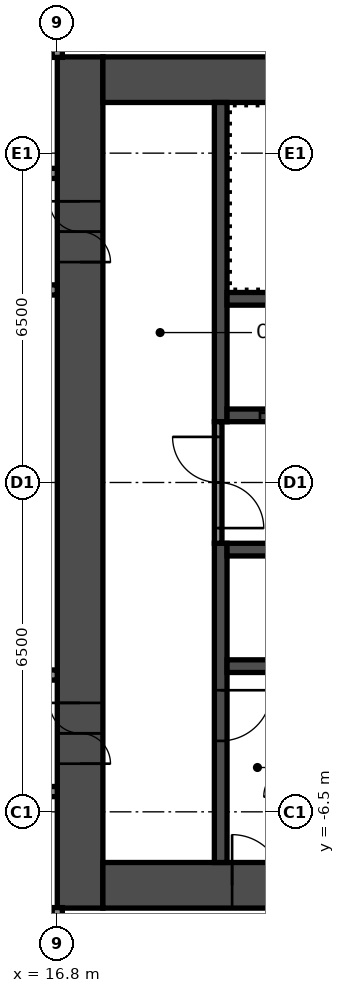
"""IFC4 building model, lengths in metres.
Left out: names, types, materials, properties, quantities, classifications, styles, units other than length and angle.
Written with IfcOpenShell. Run it as: python <this file> out.ifc"""

import sys

from ifc_helpers import new_model, si_unit, direction, frame, frame_2d, origin, place, context, subcontext, project, spatial, rectangle, extrude, element, fill, save


model = new_model("IFC4")
c1 = context("Model", 3, precision=1e-05, world=origin(), true_north=direction((0.0, 1.0)))
c2 = subcontext(c1, "Body", "Model", "MODEL_VIEW")
j1 = project(units=[si_unit("LENGTHUNIT", "METRE"), si_unit("PLANEANGLEUNIT", "RADIAN")], contexts=[c1])
p1 = place(None, origin())
s1 = spatial("IfcSite", under=j1, at=p1, CompositionType="ELEMENT")
p2 = place(p1, origin())
s2 = spatial("IfcBuilding", under=s1, at=p2, CompositionType="ELEMENT")
p3 = place(p2, frame((0.0, 0.0, 55.0)))
s3 = spatial("IfcBuildingStorey", under=s2, at=p3, CompositionType="ELEMENT", Elevation=55.0)
p4 = place(p3, frame((17.25, -8.4, 0.0), z_axis=(0.0, 0.0, 1.0), x_axis=(0.0, 1.0, 0.0)))
e1 = element("IfcWall", 1, at=p4, inside=s3, PredefinedType="SHEAR", context=c2, shape_type="SweptSolid", body=[
    extrude(rectangle(XDim=16.8, YDim=0.9, at=frame_2d((8.4, 0.0))), origin(), (0.0, 0.0, 1.0), 2.8),
])
p5 = place(p4, frame((12.75, 0.0, 0.0)))
e2 = element("IfcOpeningElement", 2, at=p5, cuts=e1, PredefinedType="OPENING", context=c2, shape_type="SweptSolid", body=[
    extrude(rectangle(XDim=1.2, YDim=2.1, at=frame_2d((0.6, 1.05))), frame((0.0, 0.46, 0.0), z_axis=(0.0, -1.0, 0.0), x_axis=(1.0, 0.0, 0.0)), (0.0, 0.0, 1.0), 0.92),
])
p6 = place(p4, frame((2.85, 0.0, 0.0)))
e3 = element("IfcOpeningElement", 3, at=p6, cuts=e1, PredefinedType="OPENING", context=c2, shape_type="SweptSolid", body=[
    extrude(rectangle(XDim=1.2, YDim=2.1, at=frame_2d((0.6, 1.05))), frame((0.0, 0.46, 0.0), z_axis=(0.0, -1.0, 0.0), x_axis=(1.0, 0.0, 0.0)), (0.0, 0.0, 1.0), 0.92),
])
p7 = place(p3, frame((17.7, 7.95, 0.0), z_axis=(0.0, 0.0, 1.0), x_axis=(1.0, 0.0, 0.0)))
e4 = element("IfcWall", 4, at=p7, inside=s3, PredefinedType="SHEAR", context=c2, shape_type="SweptSolid", body=[
    extrude(rectangle(XDim=15.0, YDim=0.9, at=frame_2d((7.5, 0.0))), origin(), (0.0, 0.0, 1.0), 2.8),
])
p8 = place(p7, frame((10.4, 0.0, 0.0)))
e5 = element("IfcOpeningElement", 5, at=p8, cuts=e4, PredefinedType="OPENING", context=c2, shape_type="SweptSolid", body=[
    extrude(rectangle(XDim=1.2, YDim=2.1, at=frame_2d((0.6, 1.05))), frame((0.0, 0.46, 0.0), z_axis=(0.0, -1.0, 0.0), x_axis=(1.0, 0.0, 0.0)), (0.0, 0.0, 1.0), 0.92),
])
p9 = place(p7, frame((13.35, 0.0, 0.0)))
e6 = element("IfcOpeningElement", 6, at=p9, cuts=e4, PredefinedType="OPENING", context=c2, shape_type="SweptSolid", body=[
    extrude(rectangle(XDim=0.9, YDim=2.1, at=frame_2d((0.45, 1.05))), frame((0.0, 0.46, 0.0), z_axis=(0.0, -1.0, 0.0), x_axis=(1.0, 0.0, 0.0)), (0.0, 0.0, 1.0), 0.92),
])
p10 = place(p3, frame((17.7, -7.95, 0.0), z_axis=(0.0, 0.0, 1.0), x_axis=(1.0, 0.0, 0.0)))
e7 = element("IfcWall", 7, at=p10, inside=s3, PredefinedType="SHEAR", context=c2, shape_type="SweptSolid", body=[
    extrude(rectangle(XDim=15.0, YDim=0.9, at=frame_2d((7.5, 0.0))), origin(), (0.0, 0.0, 1.0), 2.8),
])
p11 = place(p10, frame((2.55, 0.0, 0.0)))
e8 = element("IfcOpeningElement", 8, at=p11, cuts=e7, PredefinedType="OPENING", context=c2, shape_type="SweptSolid", body=[
    extrude(rectangle(XDim=1.0, YDim=2.1, at=frame_2d((0.5, 1.05))), frame((0.0, 0.46, 0.0), z_axis=(0.0, -1.0, 0.0), x_axis=(1.0, 0.0, 0.0)), (0.0, 0.0, 1.0), 0.92),
])
p12 = place(p3, frame((20.025, 1.2, 0.0), z_axis=(0.0, 0.0, 1.0), x_axis=(0.0, 1.0, 0.0)))
e9 = element("IfcWall", 9, at=p12, inside=s3, PredefinedType="SHEAR", context=c2, shape_type="SweptSolid", body=[
    extrude(rectangle(XDim=6.3, YDim=0.25, at=frame_2d((3.15, 0.0))), origin(), (0.0, 0.0, 1.0), 2.8),
])
p13 = place(p3, frame((20.025, -7.5, 0.0), z_axis=(0.0, 0.0, 1.0), x_axis=(0.0, 1.0, 0.0)))
e10 = element("IfcWall", 10, at=p13, inside=s3, PredefinedType="SHEAR", context=c2, shape_type="SweptSolid", body=[
    extrude(rectangle(XDim=6.3, YDim=0.25, at=frame_2d((3.15, 0.0))), origin(), (0.0, 0.0, 1.0), 2.8),
])
p14 = place(p13, frame((2.4, 0.0, 0.0)))
e11 = element("IfcOpeningElement", 11, at=p14, cuts=e10, PredefinedType="OPENING", context=c2, shape_type="SweptSolid", body=[
    extrude(rectangle(XDim=1.0, YDim=2.1, at=frame_2d((0.5, 1.05))), frame((0.0, 0.135, 0.0), z_axis=(0.0, -1.0, 0.0), x_axis=(1.0, 0.0, 0.0)), (0.0, 0.0, 1.0), 0.27),
])
p15 = place(p3, frame((20.15, 1.325, 0.0), z_axis=(0.0, 0.0, 1.0), x_axis=(1.0, 0.0, 0.0)))
e12 = element("IfcWall", 12, at=p15, inside=s3, PredefinedType="SHEAR", context=c2, shape_type="SweptSolid", body=[
    extrude(rectangle(XDim=7.5, YDim=0.25, at=frame_2d((3.75, 0.0))), origin(), (0.0, 0.0, 1.0), 2.8),
])
p16 = place(p15, frame((0.65, 0.0, 0.0)))
e13 = element("IfcOpeningElement", 13, at=p16, cuts=e12, PredefinedType="OPENING", context=c2, shape_type="SweptSolid", body=[
    extrude(rectangle(XDim=1.1, YDim=2.1, at=frame_2d((0.55, 1.05))), frame((0.0, 0.135, 0.0), z_axis=(0.0, -1.0, 0.0), x_axis=(1.0, 0.0, 0.0)), (0.0, 0.0, 1.0), 0.27),
])
p17 = place(p15, frame((3.05, 0.0, 0.0)))
e14 = element("IfcOpeningElement", 14, at=p17, cuts=e12, PredefinedType="OPENING", context=c2, shape_type="SweptSolid", body=[
    extrude(rectangle(XDim=1.1, YDim=2.1, at=frame_2d((0.55, 1.05))), frame((0.0, 0.135, 0.0), z_axis=(0.0, -1.0, 0.0), x_axis=(1.0, 0.0, 0.0)), (0.0, 0.0, 1.0), 0.27),
])
p18 = place(p15, frame((5.45, 0.0, 0.0)))
e15 = element("IfcOpeningElement", 15, at=p18, cuts=e12, PredefinedType="OPENING", context=c2, shape_type="SweptSolid", body=[
    extrude(rectangle(XDim=1.1, YDim=2.1, at=frame_2d((0.55, 1.05))), frame((0.0, 0.135, 0.0), z_axis=(0.0, -1.0, 0.0), x_axis=(1.0, 0.0, 0.0)), (0.0, 0.0, 1.0), 0.27),
])
for number, where, z_axis, x_axis in (
    (16, (20.15, 3.625, 0.0), (0.0, 0.0, 1.0), (1.0, 0.0, 0.0)),
    (17, (20.15, -1.325, 0.0), (0.0, 0.0, 1.0), (1.0, 0.0, 0.0)),
    (18, (20.15, -3.625, 0.0), (0.0, 0.0, 1.0), (1.0, 0.0, 0.0)),
):
    element("IfcWall", number, at=place(p3, frame(where, z_axis=z_axis, x_axis=x_axis)), inside=s3, PredefinedType="SHEAR", context=c2, shape_type="SweptSolid", body=[
        extrude(rectangle(XDim=7.5, YDim=0.25, at=frame_2d((3.75, 0.0))), origin(), (0.0, 0.0, 1.0), 2.8),
    ])
p19 = place(p3, frame((19.975, -1.2, 0.0), z_axis=(0.0, 0.0, 1.0), x_axis=(0.0, 1.0, 0.0)))
e19 = element("IfcWall", 19, at=p19, inside=s3, PredefinedType="PARTITIONING", context=c2, shape_type="SweptSolid", body=[
    extrude(rectangle(XDim=2.4, YDim=0.15, at=frame_2d((1.2, 0.0))), origin(), (0.0, 0.0, 1.0), 2.8),
])
p20 = place(p19, frame((0.3, 0.0, 0.0)))
e20 = element("IfcOpeningElement", 20, at=p20, cuts=e19, PredefinedType="OPENING", context=c2, shape_type="SweptSolid", body=[
    extrude(rectangle(XDim=1.8, YDim=2.1, at=frame_2d((0.9, 1.05))), frame((0.0, 0.085, 0.0), z_axis=(0.0, -1.0, 0.0), x_axis=(1.0, 0.0, 0.0)), (0.0, 0.0, 1.0), 0.17),
])
p21 = place(p3, frame((-16.8, -6.1, 0.0), z_axis=(0.0, 0.0, 1.0), x_axis=(1.0, 0.0, 0.0)))
e21 = element("IfcWall", 21, at=p21, inside=s3, PredefinedType="PARTITIONING", context=c2, shape_type="SweptSolid", body=[
    extrude(rectangle(XDim=33.6, YDim=0.2, at=frame_2d((16.8, 0.0))), origin(), (0.0, 0.0, 1.0), 2.8),
])
p22 = place(p21, frame((2.85, 0.0, 0.0)))
e22 = element("IfcOpeningElement", 22, at=p22, cuts=e21, PredefinedType="OPENING", context=c2, shape_type="SweptSolid", body=[
    extrude(rectangle(XDim=1.0, YDim=2.1, at=frame_2d((0.5, 1.05))), frame((0.0, 0.11, 0.0), z_axis=(0.0, -1.0, 0.0), x_axis=(1.0, 0.0, 0.0)), (0.0, 0.0, 1.0), 0.22),
])
p23 = place(p21, frame((4.55, 0.0, 0.0)))
e23 = element("IfcOpeningElement", 23, at=p23, cuts=e21, PredefinedType="OPENING", context=c2, shape_type="SweptSolid", body=[
    extrude(rectangle(XDim=1.0, YDim=2.1, at=frame_2d((0.5, 1.05))), frame((0.0, 0.11, 0.0), z_axis=(0.0, -1.0, 0.0), x_axis=(1.0, 0.0, 0.0)), (0.0, 0.0, 1.0), 0.22),
])
p24 = place(p21, frame((11.25, 0.0, 0.0)))
e24 = element("IfcOpeningElement", 24, at=p24, cuts=e21, PredefinedType="OPENING", context=c2, shape_type="SweptSolid", body=[
    extrude(rectangle(XDim=1.0, YDim=2.1, at=frame_2d((0.5, 1.05))), frame((0.0, 0.11, 0.0), z_axis=(0.0, -1.0, 0.0), x_axis=(1.0, 0.0, 0.0)), (0.0, 0.0, 1.0), 0.22),
])
p25 = place(p21, frame((12.95, 0.0, 0.0)))
e25 = element("IfcOpeningElement", 25, at=p25, cuts=e21, PredefinedType="OPENING", context=c2, shape_type="SweptSolid", body=[
    extrude(rectangle(XDim=1.0, YDim=2.1, at=frame_2d((0.5, 1.05))), frame((0.0, 0.11, 0.0), z_axis=(0.0, -1.0, 0.0), x_axis=(1.0, 0.0, 0.0)), (0.0, 0.0, 1.0), 0.22),
])
p26 = place(p21, frame((18.7, 0.0, 0.0)))
e26 = element("IfcOpeningElement", 26, at=p26, cuts=e21, PredefinedType="OPENING", context=c2, shape_type="SweptSolid", body=[
    extrude(rectangle(XDim=0.9, YDim=2.1, at=frame_2d((0.45, 1.05))), frame((0.0, 0.11, 0.0), z_axis=(0.0, -1.0, 0.0), x_axis=(1.0, 0.0, 0.0)), (0.0, 0.0, 1.0), 0.22),
])
p27 = place(p21, frame((22.9, 0.0, 0.0)))
e27 = element("IfcOpeningElement", 27, at=p27, cuts=e21, PredefinedType="OPENING", context=c2, shape_type="SweptSolid", body=[
    extrude(rectangle(XDim=0.9, YDim=2.1, at=frame_2d((0.45, 1.05))), frame((0.0, 0.11, 0.0), z_axis=(0.0, -1.0, 0.0), x_axis=(1.0, 0.0, 0.0)), (0.0, 0.0, 1.0), 0.22),
])
p28 = place(p21, frame((28.05, 0.0, 0.0)))
e28 = element("IfcOpeningElement", 28, at=p28, cuts=e21, PredefinedType="OPENING", context=c2, shape_type="SweptSolid", body=[
    extrude(rectangle(XDim=1.0, YDim=2.1, at=frame_2d((0.5, 1.05))), frame((0.0, 0.11, 0.0), z_axis=(0.0, -1.0, 0.0), x_axis=(1.0, 0.0, 0.0)), (0.0, 0.0, 1.0), 0.22),
])
p29 = place(p21, frame((29.75, 0.0, 0.0)))
e29 = element("IfcOpeningElement", 29, at=p29, cuts=e21, PredefinedType="OPENING", context=c2, shape_type="SweptSolid", body=[
    extrude(rectangle(XDim=1.0, YDim=2.1, at=frame_2d((0.5, 1.05))), frame((0.0, 0.11, 0.0), z_axis=(0.0, -1.0, 0.0), x_axis=(1.0, 0.0, 0.0)), (0.0, 0.0, 1.0), 0.22),
])
p30 = place(p3, frame((-16.8, -3.8, 0.0), z_axis=(0.0, 0.0, 1.0), x_axis=(1.0, 0.0, 0.0)))
e30 = element("IfcWall", 30, at=p30, inside=s3, PredefinedType="PARTITIONING", context=c2, shape_type="SweptSolid", body=[
    extrude(rectangle(XDim=33.6, YDim=0.2, at=frame_2d((16.8, 0.0))), origin(), (0.0, 0.0, 1.0), 2.8),
])
p31 = place(p30, frame((9.8, 0.0, 0.0)))
e31 = element("IfcOpeningElement", 31, at=p31, cuts=e30, PredefinedType="OPENING", context=c2, shape_type="SweptSolid", body=[
    extrude(rectangle(XDim=0.9, YDim=2.1, at=frame_2d((0.45, 1.05))), frame((0.0, 0.11, 0.0), z_axis=(0.0, -1.0, 0.0), x_axis=(1.0, 0.0, 0.0)), (0.0, 0.0, 1.0), 0.22),
])
p32 = place(p30, frame((14.0, 0.0, 0.0)))
e32 = element("IfcOpeningElement", 32, at=p32, cuts=e30, PredefinedType="OPENING", context=c2, shape_type="SweptSolid", body=[
    extrude(rectangle(XDim=0.9, YDim=2.1, at=frame_2d((0.45, 1.05))), frame((0.0, 0.11, 0.0), z_axis=(0.0, -1.0, 0.0), x_axis=(1.0, 0.0, 0.0)), (0.0, 0.0, 1.0), 0.22),
])
p33 = place(p30, frame((26.43, 0.0, 0.0)))
e33 = element("IfcOpeningElement", 33, at=p33, cuts=e30, PredefinedType="OPENING", context=c2, shape_type="SweptSolid", body=[
    extrude(rectangle(XDim=0.9, YDim=2.1, at=frame_2d((0.45, 1.05))), frame((0.0, 0.11, 0.0), z_axis=(0.0, -1.0, 0.0), x_axis=(1.0, 0.0, 0.0)), (0.0, 0.0, 1.0), 0.22),
])
p34 = place(p30, frame((30.63, 0.0, 0.0)))
e34 = element("IfcOpeningElement", 34, at=p34, cuts=e30, PredefinedType="OPENING", context=c2, shape_type="SweptSolid", body=[
    extrude(rectangle(XDim=0.9, YDim=2.1, at=frame_2d((0.45, 1.05))), frame((0.0, 0.11, 0.0), z_axis=(0.0, -1.0, 0.0), x_axis=(1.0, 0.0, 0.0)), (0.0, 0.0, 1.0), 0.22),
])
p35 = place(p3, frame((-16.8, 3.8, 0.0), z_axis=(0.0, 0.0, 1.0), x_axis=(1.0, 0.0, 0.0)))
e35 = element("IfcWall", 35, at=p35, inside=s3, PredefinedType="PARTITIONING", context=c2, shape_type="SweptSolid", body=[
    extrude(rectangle(XDim=33.6, YDim=0.2, at=frame_2d((16.8, 0.0))), origin(), (0.0, 0.0, 1.0), 2.8),
])
p36 = place(p35, frame((1.48, 0.0, 0.0)))
e36 = element("IfcOpeningElement", 36, at=p36, cuts=e35, PredefinedType="OPENING", context=c2, shape_type="SweptSolid", body=[
    extrude(rectangle(XDim=0.9, YDim=2.1, at=frame_2d((0.45, 1.05))), frame((0.0, 0.11, 0.0), z_axis=(0.0, -1.0, 0.0), x_axis=(1.0, 0.0, 0.0)), (0.0, 0.0, 1.0), 0.22),
])
p37 = place(p35, frame((5.68, 0.0, 0.0)))
e37 = element("IfcOpeningElement", 37, at=p37, cuts=e35, PredefinedType="OPENING", context=c2, shape_type="SweptSolid", body=[
    extrude(rectangle(XDim=0.9, YDim=2.1, at=frame_2d((0.45, 1.05))), frame((0.0, 0.11, 0.0), z_axis=(0.0, -1.0, 0.0), x_axis=(1.0, 0.0, 0.0)), (0.0, 0.0, 1.0), 0.22),
])
p38 = place(p35, frame((18.785, 0.0, 0.0)))
e38 = element("IfcOpeningElement", 38, at=p38, cuts=e35, PredefinedType="OPENING", context=c2, shape_type="SweptSolid", body=[
    extrude(rectangle(XDim=0.9, YDim=2.1, at=frame_2d((0.45, 1.05))), frame((0.0, 0.11, 0.0), z_axis=(0.0, -1.0, 0.0), x_axis=(1.0, 0.0, 0.0)), (0.0, 0.0, 1.0), 0.22),
])
p39 = place(p35, frame((22.985, 0.0, 0.0)))
e39 = element("IfcOpeningElement", 39, at=p39, cuts=e35, PredefinedType="OPENING", context=c2, shape_type="SweptSolid", body=[
    extrude(rectangle(XDim=0.9, YDim=2.1, at=frame_2d((0.45, 1.05))), frame((0.0, 0.11, 0.0), z_axis=(0.0, -1.0, 0.0), x_axis=(1.0, 0.0, 0.0)), (0.0, 0.0, 1.0), 0.22),
])
p40 = place(p3, frame((-16.8, 6.1, 0.0), z_axis=(0.0, 0.0, 1.0), x_axis=(1.0, 0.0, 0.0)))
e40 = element("IfcWall", 40, at=p40, inside=s3, PredefinedType="PARTITIONING", context=c2, shape_type="SweptSolid", body=[
    extrude(rectangle(XDim=33.6, YDim=0.2, at=frame_2d((16.8, 0.0))), origin(), (0.0, 0.0, 1.0), 2.8),
])
p41 = place(p40, frame((2.85, 0.0, 0.0)))
e41 = element("IfcOpeningElement", 41, at=p41, cuts=e40, PredefinedType="OPENING", context=c2, shape_type="SweptSolid", body=[
    extrude(rectangle(XDim=1.0, YDim=2.1, at=frame_2d((0.5, 1.05))), frame((0.0, 0.11, 0.0), z_axis=(0.0, -1.0, 0.0), x_axis=(1.0, 0.0, 0.0)), (0.0, 0.0, 1.0), 0.22),
])
p42 = place(p40, frame((4.55, 0.0, 0.0)))
e42 = element("IfcOpeningElement", 42, at=p42, cuts=e40, PredefinedType="OPENING", context=c2, shape_type="SweptSolid", body=[
    extrude(rectangle(XDim=1.0, YDim=2.1, at=frame_2d((0.5, 1.05))), frame((0.0, 0.11, 0.0), z_axis=(0.0, -1.0, 0.0), x_axis=(1.0, 0.0, 0.0)), (0.0, 0.0, 1.0), 0.22),
])
p43 = place(p40, frame((10.555, 0.0, 0.0)))
e43 = element("IfcOpeningElement", 43, at=p43, cuts=e40, PredefinedType="OPENING", context=c2, shape_type="SweptSolid", body=[
    extrude(rectangle(XDim=0.9, YDim=2.1, at=frame_2d((0.45, 1.05))), frame((0.0, 0.11, 0.0), z_axis=(0.0, -1.0, 0.0), x_axis=(1.0, 0.0, 0.0)), (0.0, 0.0, 1.0), 0.22),
])
p44 = place(p40, frame((14.755, 0.0, 0.0)))
e44 = element("IfcOpeningElement", 44, at=p44, cuts=e40, PredefinedType="OPENING", context=c2, shape_type="SweptSolid", body=[
    extrude(rectangle(XDim=0.9, YDim=2.1, at=frame_2d((0.45, 1.05))), frame((0.0, 0.11, 0.0), z_axis=(0.0, -1.0, 0.0), x_axis=(1.0, 0.0, 0.0)), (0.0, 0.0, 1.0), 0.22),
])
p45 = place(p40, frame((19.65, 0.0, 0.0)))
e45 = element("IfcOpeningElement", 45, at=p45, cuts=e40, PredefinedType="OPENING", context=c2, shape_type="SweptSolid", body=[
    extrude(rectangle(XDim=1.0, YDim=2.1, at=frame_2d((0.5, 1.05))), frame((0.0, 0.11, 0.0), z_axis=(0.0, -1.0, 0.0), x_axis=(1.0, 0.0, 0.0)), (0.0, 0.0, 1.0), 0.22),
])
p46 = place(p40, frame((21.35, 0.0, 0.0)))
e46 = element("IfcOpeningElement", 46, at=p46, cuts=e40, PredefinedType="OPENING", context=c2, shape_type="SweptSolid", body=[
    extrude(rectangle(XDim=1.0, YDim=2.1, at=frame_2d((0.5, 1.05))), frame((0.0, 0.11, 0.0), z_axis=(0.0, -1.0, 0.0), x_axis=(1.0, 0.0, 0.0)), (0.0, 0.0, 1.0), 0.22),
])
p47 = place(p40, frame((28.05, 0.0, 0.0)))
e47 = element("IfcOpeningElement", 47, at=p47, cuts=e40, PredefinedType="OPENING", context=c2, shape_type="SweptSolid", body=[
    extrude(rectangle(XDim=1.0, YDim=2.1, at=frame_2d((0.5, 1.05))), frame((0.0, 0.11, 0.0), z_axis=(0.0, -1.0, 0.0), x_axis=(1.0, 0.0, 0.0)), (0.0, 0.0, 1.0), 0.22),
])
p48 = place(p40, frame((29.75, 0.0, 0.0)))
e48 = element("IfcOpeningElement", 48, at=p48, cuts=e40, PredefinedType="OPENING", context=c2, shape_type="SweptSolid", body=[
    extrude(rectangle(XDim=1.0, YDim=2.1, at=frame_2d((0.5, 1.05))), frame((0.0, 0.11, 0.0), z_axis=(0.0, -1.0, 0.0), x_axis=(1.0, 0.0, 0.0)), (0.0, 0.0, 1.0), 0.22),
])
for number, where, z_axis, x_axis in (
    (49, (16.8, -20.3, 0.0), (0.0, 0.0, 1.0), (0.0, 1.0, 0.0)),
    (50, (16.8, 8.39, 0.0), (0.0, 0.0, 1.0), (0.0, 1.0, 0.0)),
):
    element("IfcWall", number, at=place(p3, frame(where, z_axis=z_axis, x_axis=x_axis)), inside=s3, PredefinedType="PARTITIONING", context=c2, shape_type="SweptSolid", body=[
        extrude(rectangle(XDim=11.91, YDim=0.2, at=frame_2d((5.955, 0.0))), origin(), (0.0, 0.0, 1.0), 2.8),
    ])
p49 = place(p5, origin())
e51 = element("IfcDoor", 51, at=p49, inside=s3, OperationType="DOUBLE_DOOR_SINGLE_SWING", PredefinedType="DOOR", context=c2, shape_type="SweptSolid", body=[
    extrude(rectangle(XDim=1.2, YDim=2.1, at=frame_2d((0.6, 1.05))), frame((0.0, 0.025, 0.0), z_axis=(0.0, -1.0, 0.0), x_axis=(1.0, 0.0, 0.0)), (0.0, 0.0, 1.0), 0.05),
])
fill(e2, e51)
p50 = place(p6, origin())
e52 = element("IfcDoor", 52, at=p50, inside=s3, OperationType="DOUBLE_DOOR_SINGLE_SWING", PredefinedType="DOOR", context=c2, shape_type="SweptSolid", body=[
    extrude(rectangle(XDim=1.2, YDim=2.1, at=frame_2d((0.6, 1.05))), frame((0.0, 0.025, 0.0), z_axis=(0.0, -1.0, 0.0), x_axis=(1.0, 0.0, 0.0)), (0.0, 0.0, 1.0), 0.05),
])
fill(e3, e52)
p51 = place(p11, origin())
e53 = element("IfcDoor", 53, at=p51, inside=s3, OperationType="SINGLE_SWING_RIGHT", PredefinedType="DOOR", context=c2, shape_type="SweptSolid", body=[
    extrude(rectangle(XDim=1.0, YDim=2.1, at=frame_2d((0.5, 1.05))), frame((0.0, 0.025, 0.0), z_axis=(0.0, -1.0, 0.0), x_axis=(1.0, 0.0, 0.0)), (0.0, 0.0, 1.0), 0.05),
])
fill(e8, e53)
p52 = place(p14, origin())
e54 = element("IfcDoor", 54, at=p52, inside=s3, OperationType="SINGLE_SWING_RIGHT", PredefinedType="DOOR", context=c2, shape_type="SweptSolid", body=[
    extrude(rectangle(XDim=1.0, YDim=2.1, at=frame_2d((0.5, 1.05))), frame((0.0, 0.025, 0.0), z_axis=(0.0, -1.0, 0.0), x_axis=(1.0, 0.0, 0.0)), (0.0, 0.0, 1.0), 0.05),
])
fill(e11, e54)
p53 = place(p20, origin())
e55 = element("IfcDoor", 55, at=p53, inside=s3, OperationType="DOUBLE_DOOR_SINGLE_SWING", PredefinedType="DOOR", context=c2, shape_type="SweptSolid", body=[
    extrude(rectangle(XDim=1.8, YDim=2.1, at=frame_2d((0.9, 1.05))), frame((0.0, 0.025, 0.0), z_axis=(0.0, -1.0, 0.0), x_axis=(1.0, 0.0, 0.0)), (0.0, 0.0, 1.0), 0.05),
])
fill(e20, e55)
p54 = place(p16, origin())
e56 = element("IfcDoor", 56, at=p54, inside=s3, OperationType="DOUBLE_DOOR_SLIDING", PredefinedType="DOOR", context=c2, shape_type="SweptSolid", body=[
    extrude(rectangle(XDim=1.1, YDim=2.1, at=frame_2d((0.55, 1.05))), frame((0.0, 0.025, 0.0), z_axis=(0.0, -1.0, 0.0), x_axis=(1.0, 0.0, 0.0)), (0.0, 0.0, 1.0), 0.05),
])
fill(e13, e56)
save(model, sys.argv[1])
